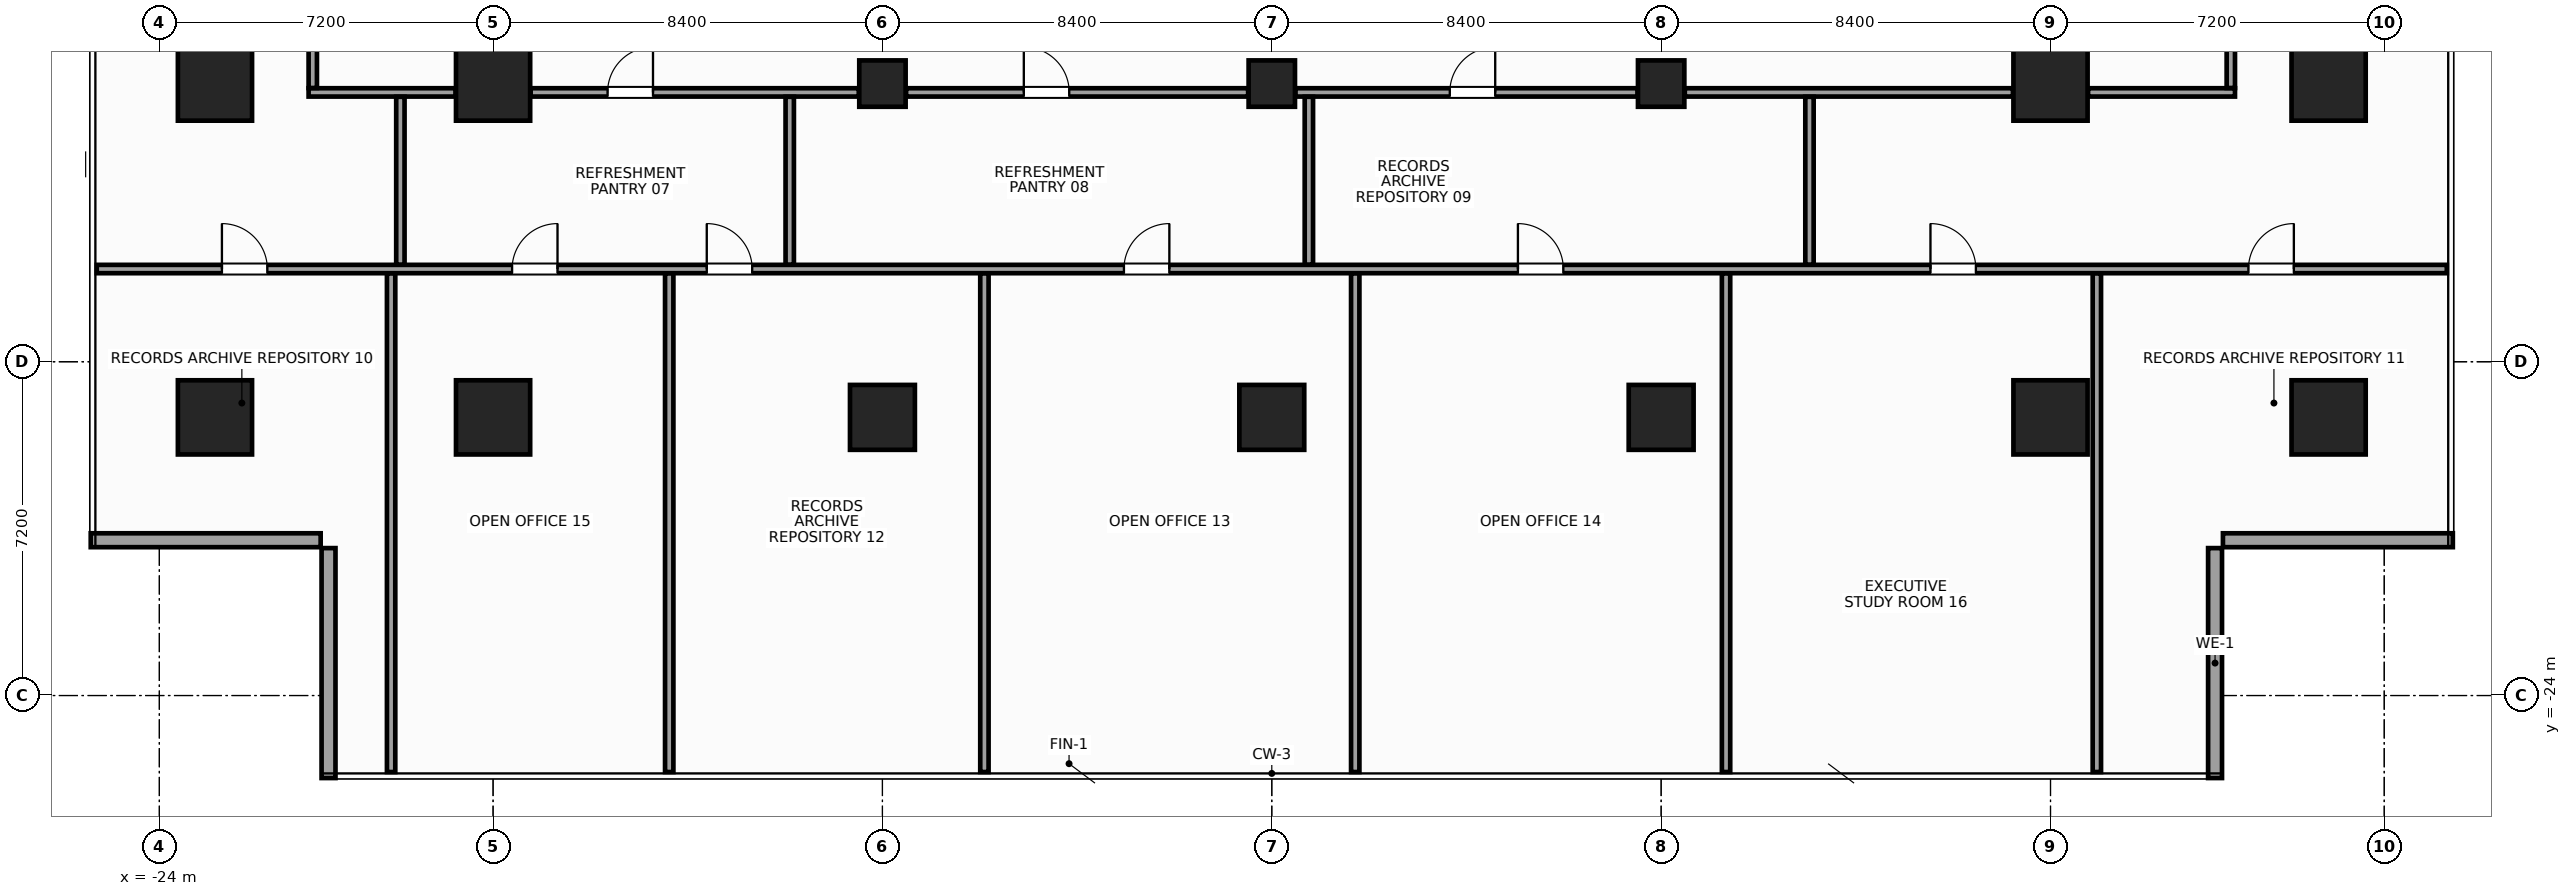
"""IFC4 building model, lengths in metres.
Left out: names, types, materials, properties, quantities, classifications, styles, units other than length and angle.
Written with IfcOpenShell. Run it as: python <this file> out.ifc"""

import sys

from ifc_helpers import new_model, si_unit, direction, frame, frame_2d, origin, origin_2d, place, context, subcontext, project, spatial, rectangle, hollow_rectangle, extrude, source, transform, mapped, element, fill, save


model = new_model("IFC4")
c1 = context("Model", 3, precision=1e-05, world=origin(), true_north=direction((0.0, 1.0)))
c2 = subcontext(c1, "Body", "Model", "MODEL_VIEW")
j1 = project(units=[si_unit("LENGTHUNIT", "METRE"), si_unit("PLANEANGLEUNIT", "RADIAN")], contexts=[c1])
p1 = place(None, origin())
s1 = spatial("IfcSite", under=j1, at=p1, CompositionType="ELEMENT")
p2 = place(p1, origin())
s2 = spatial("IfcBuilding", under=s1, at=p2, CompositionType="ELEMENT")
p3 = place(p2, frame((0.0, 0.0, 117.2)))
s3 = spatial("IfcBuildingStorey", under=s2, at=p3, CompositionType="ELEMENT", Elevation=117.2)
m1 = source(origin(), c2, "Body", "SweptSolid", [
    extrude(rectangle(XDim=1.6, YDim=1.6, at=origin_2d()), origin(), (0.0, 0.0, 1.0), 3.6),
])
for number, where, z_axis, x_axis in (
    (1, (-16.8, -18.0, 0.0), (0.0, 0.0, 1.0), (1.0, 0.0, 0.0)),
    (2, (-16.8, -10.8, 0.0), (0.0, 0.0, 1.0), (1.0, 0.0, 0.0)),
    (3, (16.8, -18.0, 0.0), (0.0, 0.0, 1.0), (1.0, 0.0, 0.0)),
    (4, (16.8, -10.8, 0.0), (0.0, 0.0, 1.0), (1.0, 0.0, 0.0)),
    (5, (-22.8, -18.0, 0.0), (0.0, 0.0, 1.0), (1.0, 0.0, 0.0)),
    (6, (-22.8, -10.8, 0.0), (0.0, 0.0, 1.0), (1.0, 0.0, 0.0)),
    (7, (22.8, -18.0, 0.0), (0.0, 0.0, 1.0), (1.0, 0.0, 0.0)),
    (8, (22.8, -10.8, 0.0), (0.0, 0.0, 1.0), (1.0, 0.0, 0.0)),
):
    element("IfcColumn", number, at=place(p3, frame(where, z_axis=z_axis, x_axis=x_axis)), inside=s3, PredefinedType="COLUMN", context=c2, shape_type="MappedRepresentation", body=[
        mapped(m1, transform((0.0, 0.0, 0.0), x_axis=(1.0, 0.0, 0.0), y_axis=(0.0, 1.0, 0.0), z_axis=(0.0, 0.0, 1.0), scale=1.0)),
    ])
m2 = source(origin(), c2, "Body", "SweptSolid", [
    extrude(rectangle(XDim=1.4, YDim=1.4, at=origin_2d()), origin(), (0.0, 0.0, 1.0), 3.6),
])
p4 = place(p3, frame((-8.4, -18.0, 0.0), z_axis=(0.0, 0.0, 1.0), x_axis=(1.0, 0.0, 0.0)))
e9 = element("IfcColumn", 9, at=p4, inside=s3, PredefinedType="COLUMN", context=c2, shape_type="MappedRepresentation", body=[
    mapped(m2, transform((0.0, 0.0, 0.0), x_axis=(1.0, 0.0, 0.0), y_axis=(0.0, 1.0, 0.0), z_axis=(0.0, 0.0, 1.0), scale=1.0)),
])
m3 = source(origin(), c2, "Body", "SweptSolid", [
    extrude(hollow_rectangle(XDim=1.0, YDim=1.0, WallThickness=0.045, at=origin_2d()), origin(), (0.0, 0.0, 1.0), 3.6),
])
p5 = place(p3, frame((-8.4, -10.8, 0.0), z_axis=(0.0, 0.0, 1.0), x_axis=(1.0, 0.0, 0.0)))
e10 = element("IfcColumn", 10, at=p5, inside=s3, PredefinedType="COLUMN", context=c2, shape_type="MappedRepresentation", body=[
    mapped(m3, transform((0.0, 0.0, 0.0), x_axis=(1.0, 0.0, 0.0), y_axis=(0.0, 1.0, 0.0), z_axis=(0.0, 0.0, 1.0), scale=1.0)),
])
p6 = place(p3, frame((8.4, -18.0, 0.0), z_axis=(0.0, 0.0, 1.0), x_axis=(1.0, 0.0, 0.0)))
e11 = element("IfcColumn", 11, at=p6, inside=s3, PredefinedType="COLUMN", context=c2, shape_type="MappedRepresentation", body=[
    mapped(m2, transform((0.0, 0.0, 0.0), x_axis=(1.0, 0.0, 0.0), y_axis=(0.0, 1.0, 0.0), z_axis=(0.0, 0.0, 1.0), scale=1.0)),
])
p7 = place(p3, frame((8.4, -10.8, 0.0), z_axis=(0.0, 0.0, 1.0), x_axis=(1.0, 0.0, 0.0)))
e12 = element("IfcColumn", 12, at=p7, inside=s3, PredefinedType="COLUMN", context=c2, shape_type="MappedRepresentation", body=[
    mapped(m3, transform((0.0, 0.0, 0.0), x_axis=(1.0, 0.0, 0.0), y_axis=(0.0, 1.0, 0.0), z_axis=(0.0, 0.0, 1.0), scale=1.0)),
])
p8 = place(p3, frame((0.0, -18.0, 0.0), z_axis=(0.0, 0.0, 1.0), x_axis=(1.0, 0.0, 0.0)))
e13 = element("IfcColumn", 13, at=p8, inside=s3, PredefinedType="COLUMN", context=c2, shape_type="MappedRepresentation", body=[
    mapped(m2, transform((0.0, 0.0, 0.0), x_axis=(1.0, 0.0, 0.0), y_axis=(0.0, 1.0, 0.0), z_axis=(0.0, 0.0, 1.0), scale=1.0)),
])
m4 = source(origin(), c2, "Body", "SweptSolid", [
    extrude(rectangle(XDim=1.0, YDim=1.0, at=origin_2d()), origin(), (0.0, 0.0, 1.0), 3.6),
])
p9 = place(p3, frame((0.0, -10.8, 0.0), z_axis=(0.0, 0.0, 1.0), x_axis=(1.0, 0.0, 0.0)))
e14 = element("IfcColumn", 14, at=p9, inside=s3, PredefinedType="COLUMN", context=c2, shape_type="MappedRepresentation", body=[
    mapped(m4, transform((0.0, 0.0, 0.0), x_axis=(1.0, 0.0, 0.0), y_axis=(0.0, 1.0, 0.0), z_axis=(0.0, 0.0, 1.0), scale=1.0)),
])
m5 = source(origin(), c2, "Body", "SweptSolid", [
    extrude(rectangle(XDim=4.96, YDim=0.3, at=frame_2d((2.48, 0.0))), origin(), (0.0, 0.0, 1.0), 2.74),
])
for number, where, z_axis, x_axis in (
    (15, (20.35, -25.78, 0.0), (0.0, 0.0, 1.0), (0.0, 1.0, 0.0)),
    (16, (20.52, -20.65, 0.0), (0.0, 0.0, 1.0), (1.0, 0.0, 0.0)),
    (17, (-25.48, -20.65, 0.0), (0.0, 0.0, 1.0), (1.0, 0.0, 0.0)),
    (18, (-20.35, -20.82, 0.0), (0.0, 0.0, 1.0), (0.0, -1.0, 0.0)),
):
    element("IfcWall", number, at=place(p3, frame(where, z_axis=z_axis, x_axis=x_axis)), inside=s3, PredefinedType="STANDARD", context=c2, shape_type="MappedRepresentation", body=[
        mapped(m5, transform((0.0, 0.0, 0.0), x_axis=(1.0, 0.0, 0.0), y_axis=(0.0, 1.0, 0.0), z_axis=(0.0, 0.0, 1.0), scale=1.0)),
    ])
m6 = source(origin(), c2, "Body", "SweptSolid", [
    extrude(rectangle(XDim=3.17, YDim=0.18, at=frame_2d((1.585, 0.0))), origin(), (0.0, 0.0, 1.0), 2.745),
])
p10 = place(p3, frame((-20.78, -10.99, 0.0), z_axis=(0.0, 0.0, 1.0), x_axis=(1.0, 0.0, 0.0)))
e19 = element("IfcWall", 19, at=p10, inside=s3, PredefinedType="PARTITIONING", context=c2, shape_type="MappedRepresentation", body=[
    mapped(m6, transform((0.0, 0.0, 0.0), x_axis=(1.0, 0.0, 0.0), y_axis=(0.0, 1.0, 0.0), z_axis=(0.0, 0.0, 1.0), scale=1.0)),
])
m7 = source(origin(), c2, "Body", "SweptSolid", [
    extrude(rectangle(XDim=7.08, YDim=0.18, at=frame_2d((3.54, 0.0))), origin(), (0.0, 0.0, 1.0), 2.745),
])
p11 = place(p3, frame((-15.99, -10.99, 0.0), z_axis=(0.0, 0.0, 1.0), x_axis=(1.0, 0.0, 0.0)))
e20 = element("IfcWall", 20, at=p11, inside=s3, PredefinedType="PARTITIONING", context=c2, shape_type="MappedRepresentation", body=[
    mapped(m7, transform((0.0, 0.0, 0.0), x_axis=(1.0, 0.0, 0.0), y_axis=(0.0, 1.0, 0.0), z_axis=(0.0, 0.0, 1.0), scale=1.0)),
])
p12 = place(p11, frame((1.66, 0.0, 0.0)))
e21 = element("IfcOpeningElement", 21, at=p12, cuts=e20, PredefinedType="OPENING", context=c2, shape_type="SweptSolid", body=[
    extrude(rectangle(XDim=0.98, YDim=2.15, at=frame_2d((0.49, 1.075))), frame((0.0, 0.102, 0.0), z_axis=(0.0, -1.0, 0.0), x_axis=(1.0, 0.0, 0.0)), (0.0, 0.0, 1.0), 0.204),
])
m8 = source(origin(), c2, "Body", "SweptSolid", [
    extrude(rectangle(XDim=7.38, YDim=0.18, at=frame_2d((3.69, 0.0))), origin(), (0.0, 0.0, 1.0), 2.745),
])
p13 = place(p3, frame((-7.89, -10.99, 0.0), z_axis=(0.0, 0.0, 1.0), x_axis=(1.0, 0.0, 0.0)))
e22 = element("IfcWall", 22, at=p13, inside=s3, PredefinedType="PARTITIONING", context=c2, shape_type="MappedRepresentation", body=[
    mapped(m8, transform((0.0, 0.0, 0.0), x_axis=(1.0, 0.0, 0.0), y_axis=(0.0, 1.0, 0.0), z_axis=(0.0, 0.0, 1.0), scale=1.0)),
])
p14 = place(p13, frame((2.54, 0.0, 0.0)))
e23 = element("IfcOpeningElement", 23, at=p14, cuts=e22, PredefinedType="OPENING", context=c2, shape_type="SweptSolid", body=[
    extrude(rectangle(XDim=0.98, YDim=2.15, at=frame_2d((0.49, 1.075))), frame((0.0, 0.102, 0.0), z_axis=(0.0, -1.0, 0.0), x_axis=(1.0, 0.0, 0.0)), (0.0, 0.0, 1.0), 0.204),
])
p15 = place(p3, frame((0.51, -10.99, 0.0), z_axis=(0.0, 0.0, 1.0), x_axis=(1.0, 0.0, 0.0)))
e24 = element("IfcWall", 24, at=p15, inside=s3, PredefinedType="PARTITIONING", context=c2, shape_type="MappedRepresentation", body=[
    mapped(m8, transform((0.0, 0.0, 0.0), x_axis=(1.0, 0.0, 0.0), y_axis=(0.0, 1.0, 0.0), z_axis=(0.0, 0.0, 1.0), scale=1.0)),
])
p16 = place(p15, frame((3.33, 0.0, 0.0)))
e25 = element("IfcOpeningElement", 25, at=p16, cuts=e24, PredefinedType="OPENING", context=c2, shape_type="SweptSolid", body=[
    extrude(rectangle(XDim=0.98, YDim=2.15, at=frame_2d((0.49, 1.075))), frame((0.0, 0.102, 0.0), z_axis=(0.0, -1.0, 0.0), x_axis=(1.0, 0.0, 0.0)), (0.0, 0.0, 1.0), 0.204),
])
p17 = place(p3, frame((8.91, -10.99, 0.0), z_axis=(0.0, 0.0, 1.0), x_axis=(1.0, 0.0, 0.0)))
e26 = element("IfcWall", 26, at=p17, inside=s3, PredefinedType="PARTITIONING", context=c2, shape_type="MappedRepresentation", body=[
    mapped(m7, transform((0.0, 0.0, 0.0), x_axis=(1.0, 0.0, 0.0), y_axis=(0.0, 1.0, 0.0), z_axis=(0.0, 0.0, 1.0), scale=1.0)),
])
p18 = place(p3, frame((17.61, -10.99, 0.0), z_axis=(0.0, 0.0, 1.0), x_axis=(1.0, 0.0, 0.0)))
e27 = element("IfcWall", 27, at=p18, inside=s3, PredefinedType="PARTITIONING", context=c2, shape_type="MappedRepresentation", body=[
    mapped(m6, transform((0.0, 0.0, 0.0), x_axis=(1.0, 0.0, 0.0), y_axis=(0.0, 1.0, 0.0), z_axis=(0.0, 0.0, 1.0), scale=1.0)),
])
m9 = source(origin(), c2, "Body", "SweptSolid", [
    extrude(rectangle(XDim=2.09, YDim=0.18, at=frame_2d((1.045, 0.0))), origin(), (0.0, 0.0, 1.0), 3.36),
])
for number, where, z_axis, x_axis in (
    (28, (-20.69, -10.895, 0.0), (0.0, 0.0, 1.0), (0.0, 1.0, 0.0)),
    (29, (20.69, -10.895, 0.0), (0.0, 0.0, 1.0), (0.0, 1.0, 0.0)),
):
    element("IfcWall", number, at=place(p3, frame(where, z_axis=z_axis, x_axis=x_axis)), inside=s3, PredefinedType="PARTITIONING", context=c2, shape_type="MappedRepresentation", body=[
        mapped(m9, transform((0.0, 0.0, 0.0), x_axis=(1.0, 0.0, 0.0), y_axis=(0.0, 1.0, 0.0), z_axis=(0.0, 0.0, 1.0), scale=1.0)),
    ])
m10 = source(origin(), c2, "Body", "SweptSolid", [
    extrude(rectangle(XDim=50.7, YDim=0.18, at=frame_2d((25.35, 0.0))), origin(), (0.0, 0.0, 1.0), 2.945),
])
p19 = place(p3, frame((-25.35, -14.8, 0.0), z_axis=(0.0, 0.0, 1.0), x_axis=(1.0, 0.0, 0.0)))
e30 = element("IfcWall", 30, at=p19, inside=s3, PredefinedType="PARTITIONING", context=c2, shape_type="MappedRepresentation", body=[
    mapped(m10, transform((0.0, 0.0, 0.0), x_axis=(1.0, 0.0, 0.0), y_axis=(0.0, 1.0, 0.0), z_axis=(0.0, 0.0, 1.0), scale=1.0)),
])
p20 = place(p19, frame((2.7, 0.0, 0.0)))
e31 = element("IfcOpeningElement", 31, at=p20, cuts=e30, PredefinedType="OPENING", context=c2, shape_type="SweptSolid", body=[
    extrude(rectangle(XDim=0.98, YDim=2.15, at=frame_2d((0.49, 1.075))), frame((0.0, 0.102, 0.0), z_axis=(0.0, -1.0, 0.0), x_axis=(1.0, 0.0, 0.0)), (0.0, 0.0, 1.0), 0.204),
])
p21 = place(p19, frame((46.42, 0.0, 0.0)))
e32 = element("IfcOpeningElement", 32, at=p21, cuts=e30, PredefinedType="OPENING", context=c2, shape_type="SweptSolid", body=[
    extrude(rectangle(XDim=0.98, YDim=2.15, at=frame_2d((0.49, 1.075))), frame((0.0, 0.102, 0.0), z_axis=(0.0, -1.0, 0.0), x_axis=(1.0, 0.0, 0.0)), (0.0, 0.0, 1.0), 0.204),
])
p22 = place(p19, frame((13.16, 0.0, 0.0)))
e33 = element("IfcOpeningElement", 33, at=p22, cuts=e30, PredefinedType="OPENING", context=c2, shape_type="SweptSolid", body=[
    extrude(rectangle(XDim=0.98, YDim=2.15, at=frame_2d((0.49, 1.075))), frame((0.0, 0.102, 0.0), z_axis=(0.0, -1.0, 0.0), x_axis=(1.0, 0.0, 0.0)), (0.0, 0.0, 1.0), 0.204),
])
p23 = place(p19, frame((22.16, 0.0, 0.0)))
e34 = element("IfcOpeningElement", 34, at=p23, cuts=e30, PredefinedType="OPENING", context=c2, shape_type="SweptSolid", body=[
    extrude(rectangle(XDim=0.98, YDim=2.15, at=frame_2d((0.49, 1.075))), frame((0.0, 0.102, 0.0), z_axis=(0.0, -1.0, 0.0), x_axis=(1.0, 0.0, 0.0)), (0.0, 0.0, 1.0), 0.204),
])
p24 = place(p19, frame((30.66, 0.0, 0.0)))
e35 = element("IfcOpeningElement", 35, at=p24, cuts=e30, PredefinedType="OPENING", context=c2, shape_type="SweptSolid", body=[
    extrude(rectangle(XDim=0.98, YDim=2.15, at=frame_2d((0.49, 1.075))), frame((0.0, 0.102, 0.0), z_axis=(0.0, -1.0, 0.0), x_axis=(1.0, 0.0, 0.0)), (0.0, 0.0, 1.0), 0.204),
])
p25 = place(p19, frame((8.96, 0.0, 0.0)))
e36 = element("IfcOpeningElement", 36, at=p25, cuts=e30, PredefinedType="OPENING", context=c2, shape_type="SweptSolid", body=[
    extrude(rectangle(XDim=0.98, YDim=2.15, at=frame_2d((0.49, 1.075))), frame((0.0, 0.102, 0.0), z_axis=(0.0, -1.0, 0.0), x_axis=(1.0, 0.0, 0.0)), (0.0, 0.0, 1.0), 0.204),
])
p26 = place(p19, frame((39.56, 0.0, 0.0)))
e37 = element("IfcOpeningElement", 37, at=p26, cuts=e30, PredefinedType="OPENING", context=c2, shape_type="SweptSolid", body=[
    extrude(rectangle(XDim=0.98, YDim=2.15, at=frame_2d((0.49, 1.075))), frame((0.0, 0.102, 0.0), z_axis=(0.0, -1.0, 0.0), x_axis=(1.0, 0.0, 0.0)), (0.0, 0.0, 1.0), 0.204),
])
m11 = source(origin(), c2, "Body", "SweptSolid", [
    extrude(rectangle(XDim=3.62, YDim=0.18, at=frame_2d((1.81, 0.0))), origin(), (0.0, 0.0, 1.0), 3.36),
])
for number, where, z_axis, x_axis in (
    (38, (-18.8, -14.705, 0.0), (0.0, 0.0, 1.0), (0.0, 1.0, 0.0)),
    (39, (-10.4, -14.705, 0.0), (0.0, 0.0, 1.0), (0.0, 1.0, 0.0)),
    (40, (0.8, -14.705, 0.0), (0.0, 0.0, 1.0), (0.0, 1.0, 0.0)),
    (41, (11.6, -14.705, 0.0), (0.0, 0.0, 1.0), (0.0, 1.0, 0.0)),
):
    element("IfcWall", number, at=place(p3, frame(where, z_axis=z_axis, x_axis=x_axis)), inside=s3, PredefinedType="PARTITIONING", context=c2, shape_type="MappedRepresentation", body=[
        mapped(m11, transform((0.0, 0.0, 0.0), x_axis=(1.0, 0.0, 0.0), y_axis=(0.0, 1.0, 0.0), z_axis=(0.0, 0.0, 1.0), scale=1.0)),
    ])
m12 = source(origin(), c2, "Body", "SweptSolid", [
    extrude(rectangle(XDim=10.755, YDim=0.18, at=frame_2d((5.377, 0.0))), origin(), (0.0, 0.0, 1.0), 2.745),
])
for number, where, z_axis, x_axis in (
    (42, (-19.0, -25.65, 0.0), (0.0, 0.0, 1.0), (0.0, 1.0, 0.0)),
    (43, (-13.0, -25.65, 0.0), (0.0, 0.0, 1.0), (0.0, 1.0, 0.0)),
    (44, (-6.2, -25.65, 0.0), (0.0, 0.0, 1.0), (0.0, 1.0, 0.0)),
    (45, (1.8, -25.65, 0.0), (0.0, 0.0, 1.0), (0.0, 1.0, 0.0)),
    (46, (9.8, -25.65, 0.0), (0.0, 0.0, 1.0), (0.0, 1.0, 0.0)),
    (47, (17.8, -25.65, 0.0), (0.0, 0.0, 1.0), (0.0, 1.0, 0.0)),
):
    element("IfcWall", number, at=place(p3, frame(where, z_axis=z_axis, x_axis=x_axis)), inside=s3, PredefinedType="PARTITIONING", context=c2, shape_type="MappedRepresentation", body=[
        mapped(m12, transform((0.0, 0.0, 0.0), x_axis=(1.0, 0.0, 0.0), y_axis=(0.0, 1.0, 0.0), z_axis=(0.0, 0.0, 1.0), scale=1.0)),
    ])
m13 = source(origin(), c2, "Body", "SweptSolid", [
    extrude(rectangle(XDim=0.98, YDim=2.15, at=frame_2d((0.49, 1.075))), frame((0.0, 0.025, 0.0), z_axis=(0.0, -1.0, 0.0), x_axis=(1.0, 0.0, 0.0)), (0.0, 0.0, 1.0), 0.05),
])
p27 = place(p12, origin())
e48 = element("IfcDoor", 48, at=p27, inside=s3, OperationType="SINGLE_SWING_RIGHT", PredefinedType="DOOR", context=c2, shape_type="MappedRepresentation", body=[
    mapped(m13, transform((0.0, 0.0, 0.0), x_axis=(1.0, 0.0, 0.0), y_axis=(0.0, 1.0, 0.0), z_axis=(0.0, 0.0, 1.0), scale=1.0)),
])
fill(e21, e48)
p28 = place(p14, origin())
e49 = element("IfcDoor", 49, at=p28, inside=s3, OperationType="SINGLE_SWING_LEFT", PredefinedType="DOOR", context=c2, shape_type="MappedRepresentation", body=[
    mapped(m13, transform((0.0, 0.0, 0.0), x_axis=(1.0, 0.0, 0.0), y_axis=(0.0, 1.0, 0.0), z_axis=(0.0, 0.0, 1.0), scale=1.0)),
])
fill(e23, e49)
p29 = place(p16, origin())
e50 = element("IfcDoor", 50, at=p29, inside=s3, OperationType="SINGLE_SWING_RIGHT", PredefinedType="DOOR", context=c2, shape_type="MappedRepresentation", body=[
    mapped(m13, transform((0.0, 0.0, 0.0), x_axis=(1.0, 0.0, 0.0), y_axis=(0.0, 1.0, 0.0), z_axis=(0.0, 0.0, 1.0), scale=1.0)),
])
fill(e25, e50)
p30 = place(p20, origin())
e51 = element("IfcDoor", 51, at=p30, inside=s3, OperationType="SINGLE_SWING_LEFT", PredefinedType="DOOR", context=c2, shape_type="MappedRepresentation", body=[
    mapped(m13, transform((0.0, 0.0, 0.0), x_axis=(1.0, 0.0, 0.0), y_axis=(0.0, 1.0, 0.0), z_axis=(0.0, 0.0, 1.0), scale=1.0)),
])
fill(e31, e51)
p31 = place(p21, origin())
e52 = element("IfcDoor", 52, at=p31, inside=s3, OperationType="SINGLE_SWING_RIGHT", PredefinedType="DOOR", context=c2, shape_type="MappedRepresentation", body=[
    mapped(m13, transform((0.0, 0.0, 0.0), x_axis=(1.0, 0.0, 0.0), y_axis=(0.0, 1.0, 0.0), z_axis=(0.0, 0.0, 1.0), scale=1.0)),
])
fill(e32, e52)
p32 = place(p22, origin())
e53 = element("IfcDoor", 53, at=p32, inside=s3, OperationType="SINGLE_SWING_LEFT", PredefinedType="DOOR", context=c2, shape_type="MappedRepresentation", body=[
    mapped(m13, transform((0.0, 0.0, 0.0), x_axis=(1.0, 0.0, 0.0), y_axis=(0.0, 1.0, 0.0), z_axis=(0.0, 0.0, 1.0), scale=1.0)),
])
fill(e33, e53)
p33 = place(p23, origin())
e54 = element("IfcDoor", 54, at=p33, inside=s3, OperationType="SINGLE_SWING_RIGHT", PredefinedType="DOOR", context=c2, shape_type="MappedRepresentation", body=[
    mapped(m13, transform((0.0, 0.0, 0.0), x_axis=(1.0, 0.0, 0.0), y_axis=(0.0, 1.0, 0.0), z_axis=(0.0, 0.0, 1.0), scale=1.0)),
])
fill(e34, e54)
p34 = place(p24, origin())
e55 = element("IfcDoor", 55, at=p34, inside=s3, OperationType="SINGLE_SWING_LEFT", PredefinedType="DOOR", context=c2, shape_type="MappedRepresentation", body=[
    mapped(m13, transform((0.0, 0.0, 0.0), x_axis=(1.0, 0.0, 0.0), y_axis=(0.0, 1.0, 0.0), z_axis=(0.0, 0.0, 1.0), scale=1.0)),
])
fill(e35, e55)
p35 = place(p25, origin())
e56 = element("IfcDoor", 56, at=p35, inside=s3, OperationType="SINGLE_SWING_RIGHT", PredefinedType="DOOR", context=c2, shape_type="MappedRepresentation", body=[
    mapped(m13, transform((0.0, 0.0, 0.0), x_axis=(1.0, 0.0, 0.0), y_axis=(0.0, 1.0, 0.0), z_axis=(0.0, 0.0, 1.0), scale=1.0)),
])
fill(e36, e56)
p36 = place(p26, origin())
e57 = element("IfcDoor", 57, at=p36, inside=s3, OperationType="SINGLE_SWING_LEFT", PredefinedType="DOOR", context=c2, shape_type="MappedRepresentation", body=[
    mapped(m13, transform((0.0, 0.0, 0.0), x_axis=(1.0, 0.0, 0.0), y_axis=(0.0, 1.0, 0.0), z_axis=(0.0, 0.0, 1.0), scale=1.0)),
])
fill(e37, e57)
save(model, sys.argv[1])
